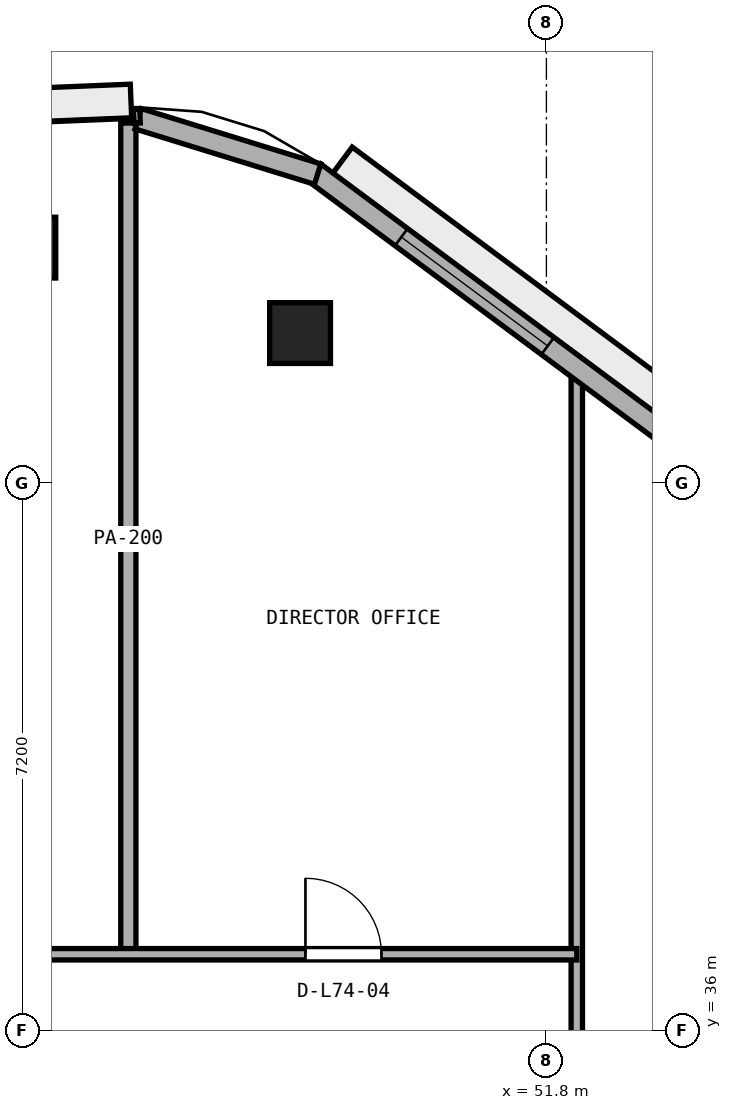
"""IFC4 building model, lengths in metres.
Left out: names, types, materials, properties, quantities, classifications, styles, units other than length and angle.
Written with IfcOpenShell. Run it as: python <this file> out.ifc"""

import sys

from ifc_helpers import new_model, si_unit, direction, frame, frame_2d, origin, origin_2d, place, context, subcontext, project, spatial, rectangle, extrude, element, fill, save


model = new_model("IFC4")
c1 = context("Model", 3, precision=1e-05, world=origin(), true_north=direction((0.0, 1.0)))
c2 = subcontext(c1, "Body", "Model", "MODEL_VIEW")
j1 = project(units=[si_unit("LENGTHUNIT", "METRE"), si_unit("PLANEANGLEUNIT", "RADIAN")], contexts=[c1])
p1 = place(None, origin())
s1 = spatial("IfcSite", under=j1, at=p1, CompositionType="ELEMENT")
p2 = place(p1, origin())
s2 = spatial("IfcBuilding", under=s1, at=p2, CompositionType="ELEMENT")
p3 = place(p2, frame((0.0, 0.0, 289.6)))
s3 = spatial("IfcBuildingStorey", under=s2, at=p3, CompositionType="ELEMENT", Elevation=289.6)
for number, where, z_axis, x_axis in (
    (1, (48.559, 45.173, 0.0), (0.0, 0.0, 1.0), (1.0, 0.0, 0.0)),
    (2, (44.945, 46.297, 0.0), (0.0, 0.0, 1.0), (1.0, 0.0, 0.0)),
):
    element("IfcColumn", number, at=place(p3, frame(where, z_axis=z_axis, x_axis=x_axis)), inside=s3, PredefinedType="COLUMN", context=c2, shape_type="SweptSolid", body=[
        extrude(rectangle(XDim=0.8, YDim=0.8, at=origin_2d()), origin(), (0.0, 0.0, 1.0), 3.8),
    ])
p4 = place(p3, frame((52.2, 22.6, 0.0), z_axis=(0.0, 0.0, 1.0), x_axis=(0.0, 1.0, 0.0)))
e3 = element("IfcWall", 3, at=p4, inside=s3, PredefinedType="PARTITIONING", context=c2, shape_type="SweptSolid", body=[
    extrude(rectangle(XDim=22.153, YDim=0.15, at=frame_2d((11.076, 0.0))), origin(), (0.0, 0.0, 1.0), 3.54),
])
p5 = place(p4, frame((1.87, 0.0, 0.0)))
e4 = element("IfcOpeningElement", 4, at=p5, cuts=e3, PredefinedType="OPENING", context=c2, shape_type="SweptSolid", body=[
    extrude(rectangle(XDim=1.0, YDim=2.12, at=frame_2d((0.5, 1.06))), frame((0.0, 0.085, 0.0), z_axis=(0.0, -1.0, 0.0), x_axis=(1.0, 0.0, 0.0)), (0.0, 0.0, 1.0), 0.17),
])
p6 = place(p4, frame((8.95, 0.0, 0.0)))
e5 = element("IfcOpeningElement", 5, at=p6, cuts=e3, PredefinedType="OPENING", context=c2, shape_type="SweptSolid", body=[
    extrude(rectangle(XDim=1.0, YDim=2.12, at=frame_2d((0.5, 1.06))), frame((0.0, 0.085, 0.0), z_axis=(0.0, -1.0, 0.0), x_axis=(1.0, 0.0, 0.0)), (0.0, 0.0, 1.0), 0.17),
])
p7 = place(p3, frame((46.3, 37.0, 0.0), z_axis=(0.0, 0.0, 1.0), x_axis=(0.0, 1.0, 0.0)))
e6 = element("IfcWall", 6, at=p7, inside=s3, PredefinedType="PARTITIONING", context=c2, shape_type="SweptSolid", body=[
    extrude(rectangle(XDim=10.935, YDim=0.2, at=frame_2d((5.468, 0.0))), origin(), (0.0, 0.0, 1.0), 3.54),
])
p8 = place(p3, frame((38.35, 37.0, 0.0), z_axis=(0.0, 0.0, 1.0), x_axis=(1.0, 0.0, 0.0)))
e7 = element("IfcWall", 7, at=p8, inside=s3, PredefinedType="PARTITIONING", context=c2, shape_type="SweptSolid", body=[
    extrude(rectangle(XDim=13.85, YDim=0.15, at=frame_2d((6.925, 0.0))), origin(), (0.0, 0.0, 1.0), 3.54),
])
p9 = place(p8, frame((10.28, 0.0, 0.0)))
e8 = element("IfcOpeningElement", 8, at=p9, cuts=e7, PredefinedType="OPENING", context=c2, shape_type="SweptSolid", body=[
    extrude(rectangle(XDim=1.0, YDim=2.12, at=frame_2d((0.5, 1.06))), frame((0.0, 0.085, 0.0), z_axis=(0.0, -1.0, 0.0), x_axis=(1.0, 0.0, 0.0)), (0.0, 0.0, 1.0), 0.17),
])
p10 = place(p3, frame((60.984, 38.187, 0.0), z_axis=(0.0, 0.0, 1.0), x_axis=(-0.802485144343, 0.596672098484, 0.0)))
e9 = element("IfcWall", 9, at=p10, inside=s3, PredefinedType="STANDARD", context=c2, shape_type="SweptSolid", body=[
    extrude(rectangle(XDim=15.248, YDim=0.28, at=frame_2d((7.624, 0.0))), origin(), (0.0, 0.0, 1.0), 3.54),
])
p11 = place(p10, frame((1.675, 0.0, 0.9)))
e10 = element("IfcOpeningElement", 10, at=p11, cuts=e9, PredefinedType="OPENING", context=c2, shape_type="SweptSolid", body=[
    extrude(rectangle(XDim=2.4, YDim=1.75, at=frame_2d((1.2, 0.875))), frame((0.0, 0.15, 0.0), z_axis=(0.0, -1.0, 0.0), x_axis=(1.0, 0.0, 0.0)), (0.0, 0.0, 1.0), 0.3),
])
p12 = place(p10, frame((6.424, 0.0, 0.9)))
e11 = element("IfcOpeningElement", 11, at=p12, cuts=e9, PredefinedType="OPENING", context=c2, shape_type="SweptSolid", body=[
    extrude(rectangle(XDim=2.4, YDim=1.75, at=frame_2d((1.2, 0.875))), frame((0.0, 0.15, 0.0), z_axis=(0.0, -1.0, 0.0), x_axis=(1.0, 0.0, 0.0)), (0.0, 0.0, 1.0), 0.3),
])
p13 = place(p10, frame((11.423, 0.0, 0.9)))
e12 = element("IfcOpeningElement", 12, at=p13, cuts=e9, PredefinedType="OPENING", context=c2, shape_type="SweptSolid", body=[
    extrude(rectangle(XDim=2.4, YDim=1.75, at=frame_2d((1.2, 0.875))), frame((0.0, 0.15, 0.0), z_axis=(0.0, -1.0, 0.0), x_axis=(1.0, 0.0, 0.0)), (0.0, 0.0, 1.0), 0.3),
])
p14 = place(p3, frame((48.79, 47.264, 0.0), z_axis=(0.0, 0.0, 1.0), x_axis=(-0.955575823363, 0.294745391489, 0.0)))
e13 = element("IfcWall", 13, at=p14, inside=s3, PredefinedType="STANDARD", context=c2, shape_type="SweptSolid", body=[
    extrude(rectangle(XDim=2.471, YDim=0.28, at=frame_2d((1.235, 0.0))), origin(), (0.0, 0.0, 1.0), 3.54),
])
p15 = place(p9, origin())
e14 = element("IfcDoor", 14, at=p15, inside=s3, OperationType="SINGLE_SWING_LEFT", PredefinedType="DOOR", context=c2, shape_type="SweptSolid", body=[
    extrude(rectangle(XDim=1.0, YDim=2.12, at=frame_2d((0.5, 1.06))), frame((0.0, 0.025, 0.0), z_axis=(0.0, -1.0, 0.0), x_axis=(1.0, 0.0, 0.0)), (0.0, 0.0, 1.0), 0.05),
])
fill(e8, e14)
p16 = place(p13, origin())
e15 = element("IfcWindow", 15, at=p16, inside=s3, PartitioningType="SINGLE_PANEL", PredefinedType="WINDOW", context=c2, shape_type="SweptSolid", body=[
    extrude(rectangle(XDim=2.4, YDim=1.75, at=frame_2d((1.2, 0.875))), frame((0.0, 0.03, 0.0), z_axis=(0.0, -1.0, 0.0), x_axis=(1.0, 0.0, 0.0)), (0.0, 0.0, 1.0), 0.06),
])
fill(e12, e15)
save(model, sys.argv[1])
